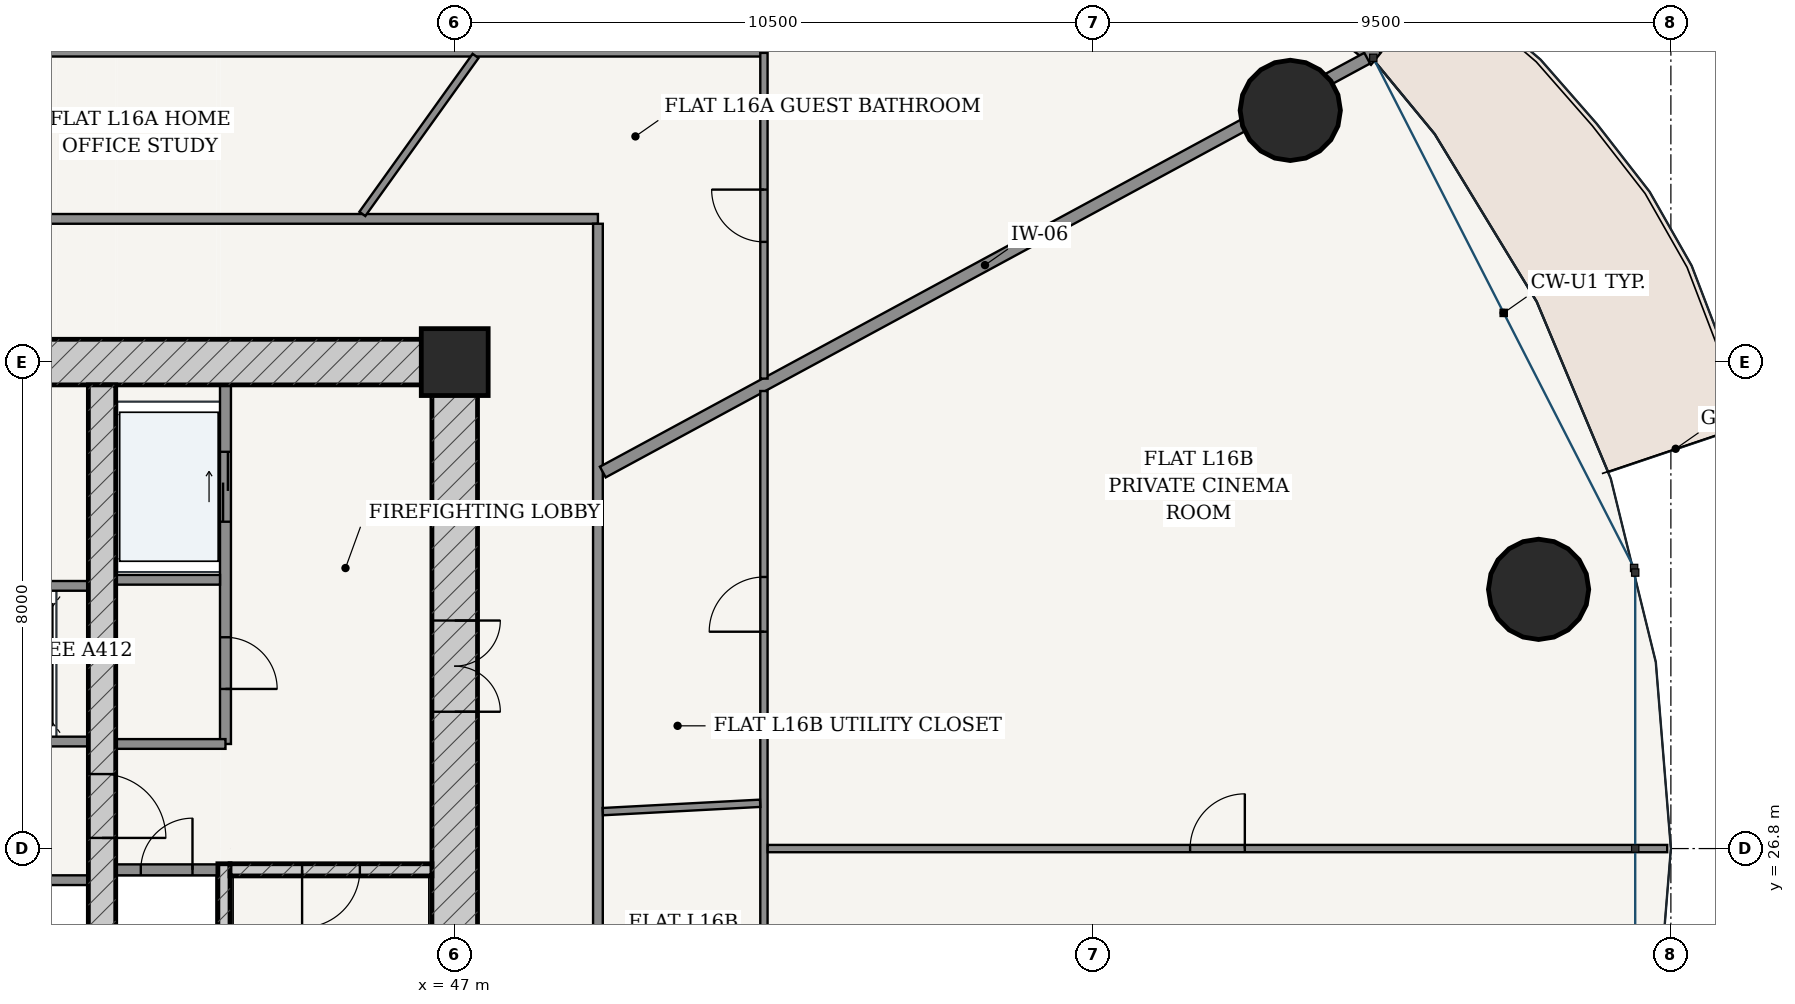
"""IFC4 building model, lengths in metres.
Left out: names, types, materials, properties, quantities, classifications, styles, units other than length and angle.
Written with IfcOpenShell. Run it as: python <this file> out.ifc"""

import sys

from ifc_helpers import new_model, si_unit, direction, frame, frame_2d, origin, origin_2d, place, context, subcontext, project, spatial, rectangle, hollow_circle, extrude, source, transform, mapped, element, fill, save


model = new_model("IFC4")
c1 = context("Model", 3, precision=1e-05, world=origin(), true_north=direction((-0.2419218956, 0.970295726276)))
c2 = subcontext(c1, "Body", "Model", "MODEL_VIEW")
j1 = project(units=[si_unit("LENGTHUNIT", "METRE"), si_unit("PLANEANGLEUNIT", "RADIAN")], contexts=[c1])
p1 = place(None, origin())
s1 = spatial("IfcSite", under=j1, at=p1, CompositionType="ELEMENT")
p2 = place(p1, origin())
s2 = spatial("IfcBuilding", under=s1, at=p2, CompositionType="ELEMENT")
p3 = place(p2, frame((0.0, 0.0, 63.6)))
s3 = spatial("IfcBuildingStorey", under=s2, at=p3, CompositionType="ELEMENT", Elevation=63.6)
p4 = place(p3, frame((47.0, 34.8, 0.0), z_axis=(0.0, 0.0, 1.0), x_axis=(1.0, 0.0, 0.0)))
e1 = element("IfcColumn", 1, at=p4, inside=s3, PredefinedType="COLUMN", context=c2, shape_type="SweptSolid", body=[
    extrude(rectangle(XDim=1.1, YDim=1.1, at=origin_2d()), origin(), (0.0, 0.0, 1.0), 3.6),
])
p5 = place(p3, frame((28.625, 34.8, 0.0), z_axis=(0.0, 0.0, 1.0), x_axis=(1.0, 0.0, 0.0)))
e2 = element("IfcWall", 2, at=p5, inside=s3, PredefinedType="SHEAR", context=c2, shape_type="SweptSolid", body=[
    extrude(rectangle(XDim=18.75, YDim=0.75, at=frame_2d((9.375, 0.0))), origin(), (0.0, 0.0, 1.0), 3.32),
])
p6 = place(p5, frame((8.95, 0.0, 0.0)))
e3 = element("IfcOpeningElement", 3, at=p6, cuts=e2, PredefinedType="OPENING", context=c2, shape_type="SweptSolid", body=[
    extrude(rectangle(XDim=0.85, YDim=2.1, at=frame_2d((0.425, 1.05))), frame((0.0, 0.385, 0.0), z_axis=(0.0, -1.0, 0.0), x_axis=(1.0, 0.0, 0.0)), (0.0, 0.0, 1.0), 0.77),
])
p7 = place(p3, frame((47.0, 19.175, 0.0), z_axis=(0.0, 0.0, 1.0), x_axis=(0.0, 1.0, 0.0)))
e4 = element("IfcWall", 4, at=p7, inside=s3, PredefinedType="SHEAR", context=c2, shape_type="SweptSolid", body=[
    extrude(rectangle(XDim=15.25, YDim=0.75, at=frame_2d((7.625, 0.0))), origin(), (0.0, 0.0, 1.0), 3.32),
])
p8 = place(p7, frame((9.875, 0.0, 0.0)))
e5 = element("IfcOpeningElement", 5, at=p8, cuts=e4, PredefinedType="OPENING", context=c2, shape_type="SweptSolid", body=[
    extrude(rectangle(XDim=1.5, YDim=2.2, at=frame_2d((0.75, 1.1))), frame((0.0, 0.385, 0.0), z_axis=(0.0, -1.0, 0.0), x_axis=(1.0, 0.0, 0.0)), (0.0, 0.0, 1.0), 0.77),
])
p9 = place(p3, frame((43.205, 19.175, 0.0), z_axis=(0.0, 0.0, 1.0), x_axis=(0.0, 1.0, 0.0)))
e6 = element("IfcWall", 6, at=p9, inside=s3, PredefinedType="SOLIDWALL", context=c2, shape_type="SweptSolid", body=[
    extrude(rectangle(XDim=7.375, YDim=0.2, at=frame_2d((3.688, 0.0))), origin(), (0.0, 0.0, 1.0), 3.32),
])
p10 = place(p3, frame((43.305, 26.45, 0.0), z_axis=(0.0, 0.0, 1.0), x_axis=(1.0, 0.0, 0.0)))
e7 = element("IfcWall", 7, at=p10, inside=s3, PredefinedType="SOLIDWALL", context=c2, shape_type="SweptSolid", body=[
    extrude(rectangle(XDim=3.32, YDim=0.2, at=frame_2d((1.66, 0.0))), origin(), (0.0, 0.0, 1.0), 3.32),
])
p11 = place(p10, frame((1.185, 0.0, 0.0)))
e8 = element("IfcOpeningElement", 8, at=p11, cuts=e7, PredefinedType="OPENING", context=c2, shape_type="SweptSolid", body=[
    extrude(rectangle(XDim=0.95, YDim=2.15, at=frame_2d((0.475, 1.075))), frame((0.0, 0.11, 0.0), z_axis=(0.0, -1.0, 0.0), x_axis=(1.0, 0.0, 0.0)), (0.0, 0.0, 1.0), 0.22),
])
p12 = place(p3, frame((41.2, 19.175, 0.0), z_axis=(0.0, 0.0, 1.0), x_axis=(0.0, 1.0, 0.0)))
e9 = element("IfcWall", 9, at=p12, inside=s3, PredefinedType="SHEAR", context=c2, shape_type="SweptSolid", body=[
    extrude(rectangle(XDim=15.25, YDim=0.45, at=frame_2d((7.625, 0.0))), origin(), (0.0, 0.0, 1.0), 3.32),
])
p13 = place(p12, frame((7.8, 0.0, 0.0)))
e10 = element("IfcOpeningElement", 10, at=p13, cuts=e9, PredefinedType="OPENING", context=c2, shape_type="SweptSolid", body=[
    extrude(rectangle(XDim=1.05, YDim=2.15, at=frame_2d((0.525, 1.075))), frame((0.0, 0.235, 0.0), z_axis=(0.0, -1.0, 0.0), x_axis=(1.0, 0.0, 0.0)), (0.0, 0.0, 1.0), 0.47),
])
for number, where, z_axis, x_axis in (
    (11, (64.824, 31.063, 0.0), (0.0, 0.0, 1.0), (1.0, 0.0, 0.0)),
    (12, (60.741, 38.939, 0.0), (0.0, 0.0, 1.0), (1.0, 0.0, 0.0)),
):
    element("IfcColumn", number, at=place(p3, frame(where, z_axis=z_axis, x_axis=x_axis)), inside=s3, PredefinedType="COLUMN", context=c2, shape_type="SweptSolid", body=[
        extrude(hollow_circle(Radius=0.825, WallThickness=0.05, at=origin_2d()), origin(), (0.0, 0.0, 1.0), 3.6),
    ])
p14 = place(p3, frame((62.15, 39.789, 0.0), z_axis=(0.0, 0.0, 1.0), x_axis=(-0.777005352078, 0.62949398952, 0.0)))
e13 = element("IfcWall", 13, at=p14, inside=s3, PredefinedType="SOLIDWALL", context=c2, shape_type="SweptSolid", body=[
    extrude(rectangle(XDim=10.447, YDim=0.26, at=frame_2d((5.223, 0.0))), origin(), (0.0, 0.0, 1.0), 3.32),
])
p15 = place(p14, frame((4.548, 0.0, 0.0)))
e14 = element("IfcOpeningElement", 14, at=p15, cuts=e13, PredefinedType="OPENING", context=c2, shape_type="SweptSolid", body=[
    extrude(rectangle(XDim=1.35, YDim=2.2, at=frame_2d((0.675, 1.1))), frame((0.0, 0.14, 0.0), z_axis=(0.0, -1.0, 0.0), x_axis=(1.0, 0.0, 0.0)), (0.0, 0.0, 1.0), 0.28),
])
p16 = place(p3, frame((41.425, 26.45, 0.0), z_axis=(0.0, 0.0, 1.0), x_axis=(1.0, 0.0, 0.0)))
e15 = element("IfcWall", 15, at=p16, inside=s3, PredefinedType="PARTITIONING", context=c2, shape_type="SweptSolid", body=[
    extrude(rectangle(XDim=1.675, YDim=0.18, at=frame_2d((0.837, 0.0))), origin(), (0.0, 0.0, 1.0), 3.32),
])
p17 = place(p16, frame((0.413, 0.0, 0.0)))
e16 = element("IfcOpeningElement", 16, at=p17, cuts=e15, PredefinedType="OPENING", context=c2, shape_type="SweptSolid", body=[
    extrude(rectangle(XDim=0.85, YDim=2.1, at=frame_2d((0.425, 1.05))), frame((0.0, 0.1, 0.0), z_axis=(0.0, -1.0, 0.0), x_axis=(1.0, 0.0, 0.0)), (0.0, 0.0, 1.0), 0.2),
])
p18 = place(p3, frame((43.23, 28.52, 0.0), z_axis=(0.0, 0.0, 1.0), x_axis=(0.0, 1.0, 0.0)))
e17 = element("IfcWall", 17, at=p18, inside=s3, PredefinedType="PARTITIONING", context=c2, shape_type="SweptSolid", body=[
    extrude(rectangle(XDim=5.905, YDim=0.18, at=frame_2d((2.953, 0.0))), origin(), (0.0, 0.0, 1.0), 3.32),
])
p19 = place(p18, frame((0.905, 0.0, 0.0)))
e18 = element("IfcOpeningElement", 18, at=p19, cuts=e17, PredefinedType="OPENING", context=c2, shape_type="SweptSolid", body=[
    extrude(rectangle(XDim=0.85, YDim=2.1, at=frame_2d((0.425, 1.05))), frame((0.0, 0.1, 0.0), z_axis=(0.0, -1.0, 0.0), x_axis=(1.0, 0.0, 0.0)), (0.0, 0.0, 1.0), 0.2),
])
p20 = place(p18, frame((3.655, 0.0, 0.0)))
e19 = element("IfcOpeningElement", 19, at=p20, cuts=e17, PredefinedType="OPENING", context=c2, shape_type="SweptSolid", body=[
    extrude(rectangle(XDim=1.15, YDim=2.2, at=frame_2d((0.575, 1.1))), frame((0.0, 0.1, 0.0), z_axis=(0.0, -1.0, 0.0), x_axis=(1.0, 0.0, 0.0)), (0.0, 0.0, 1.0), 0.2),
])
p21 = place(p3, frame((41.425, 31.22, 0.0), z_axis=(0.0, 0.0, 1.0), x_axis=(1.0, 0.0, 0.0)))
e20 = element("IfcWall", 20, at=p21, inside=s3, PredefinedType="PARTITIONING", context=c2, shape_type="SweptSolid", body=[
    extrude(rectangle(XDim=1.715, YDim=0.16, at=frame_2d((0.857, 0.0))), origin(), (0.0, 0.0, 1.0), 3.32),
])
p22 = place(p3, frame((41.425, 28.52, 0.0), z_axis=(0.0, 0.0, 1.0), x_axis=(1.0, 0.0, 0.0)))
e21 = element("IfcWall", 21, at=p22, inside=s3, PredefinedType="PARTITIONING", context=c2, shape_type="SweptSolid", body=[
    extrude(rectangle(XDim=1.805, YDim=0.16, at=frame_2d((0.902, 0.0))), origin(), (0.0, 0.0, 1.0), 3.32),
])
p23 = place(p3, frame((35.025, 28.56, 0.0), z_axis=(0.0, 0.0, 1.0), x_axis=(1.0, 0.0, 0.0)))
e22 = element("IfcWall", 22, at=p23, inside=s3, PredefinedType="PARTITIONING", context=c2, shape_type="SweptSolid", body=[
    extrude(rectangle(XDim=5.95, YDim=0.16, at=frame_2d((2.975, 0.0))), origin(), (0.0, 0.0, 1.0), 3.32),
])
p24 = place(p23, frame((0.76, 0.0, 0.0)))
e23 = element("IfcOpeningElement", 23, at=p24, cuts=e22, PredefinedType="OPENING", context=c2, shape_type="SweptSolid", body=[
    extrude(rectangle(XDim=1.1, YDim=2.2, at=frame_2d((0.55, 1.1))), frame((0.0, 0.09, 0.0), z_axis=(0.0, -1.0, 0.0), x_axis=(1.0, 0.0, 0.0)), (0.0, 0.0, 1.0), 0.18),
])
p25 = place(p23, frame((2.425, 0.0, 0.0)))
e24 = element("IfcOpeningElement", 24, at=p25, cuts=e22, PredefinedType="OPENING", context=c2, shape_type="SweptSolid", body=[
    extrude(rectangle(XDim=1.1, YDim=2.2, at=frame_2d((0.55, 1.1))), frame((0.0, 0.09, 0.0), z_axis=(0.0, -1.0, 0.0), x_axis=(1.0, 0.0, 0.0)), (0.0, 0.0, 1.0), 0.18),
])
p26 = place(p23, frame((4.09, 0.0, 0.0)))
e25 = element("IfcOpeningElement", 25, at=p26, cuts=e22, PredefinedType="OPENING", context=c2, shape_type="SweptSolid", body=[
    extrude(rectangle(XDim=1.1, YDim=2.2, at=frame_2d((0.55, 1.1))), frame((0.0, 0.09, 0.0), z_axis=(0.0, -1.0, 0.0), x_axis=(1.0, 0.0, 0.0)), (0.0, 0.0, 1.0), 0.18),
])
for number, where, z_axis, x_axis in (
    (26, (35.025, 31.12, 0.0), (0.0, 0.0, 1.0), (1.0, 0.0, 0.0)),
    (27, (35.025, 26.28, 0.0), (0.0, 0.0, 1.0), (1.0, 0.0, 0.0)),
):
    element("IfcWall", number, at=place(p3, frame(where, z_axis=z_axis, x_axis=x_axis)), inside=s3, PredefinedType="PARTITIONING", context=c2, shape_type="SweptSolid", body=[
        extrude(rectangle(XDim=5.95, YDim=0.16, at=frame_2d((2.975, 0.0))), origin(), (0.0, 0.0, 1.0), 3.32),
    ])
p27 = place(p3, frame((26.645, 37.155, 0.0), z_axis=(0.0, 0.0, 1.0), x_axis=(1.0, 0.0, 0.0)))
e28 = element("IfcWall", 28, at=p27, inside=s3, PredefinedType="PARTITIONING", context=c2, shape_type="SweptSolid", body=[
    extrude(rectangle(XDim=22.71, YDim=0.16, at=frame_2d((11.355, 0.0))), origin(), (0.0, 0.0, 1.0), 2.688),
])
p28 = place(p3, frame((49.355, 16.525, 0.0), z_axis=(0.0, 0.0, 1.0), x_axis=(0.0, 1.0, 0.0)))
e29 = element("IfcWall", 29, at=p28, inside=s3, PredefinedType="PARTITIONING", context=c2, shape_type="SweptSolid", body=[
    extrude(rectangle(XDim=20.55, YDim=0.16, at=frame_2d((10.275, 0.0))), origin(), (0.0, 0.0, 1.0), 2.688),
])
p29 = place(p28, frame((2.733, 0.0, 0.0)))
e30 = element("IfcOpeningElement", 30, at=p29, cuts=e29, PredefinedType="OPENING", context=c2, shape_type="SweptSolid", body=[
    extrude(rectangle(XDim=0.98, YDim=2.2, at=frame_2d((0.49, 1.1))), frame((0.0, 0.09, 0.0), z_axis=(0.0, -1.0, 0.0), x_axis=(1.0, 0.0, 0.0)), (0.0, 0.0, 1.0), 0.18),
])
p30 = place(p3, frame((49.435, 32.991, 0.0), z_axis=(0.0, 0.0, 1.0), x_axis=(0.879369737803, 0.476139542819, 0.0)))
e31 = element("IfcWall", 31, at=p30, inside=s3, PredefinedType="PARTITIONING", context=c2, shape_type="SweptSolid", body=[
    extrude(rectangle(XDim=14.295, YDim=0.2, at=frame_2d((7.147, 0.0))), origin(), (0.0, 0.0, 1.0), 2.688),
])
p31 = place(p3, frame((23.915, 39.885, 0.0), z_axis=(0.0, 0.0, 1.0), x_axis=(1.0, 0.0, 0.0)))
e32 = element("IfcWall", 32, at=p31, inside=s3, PredefinedType="PARTITIONING", context=c2, shape_type="SweptSolid", body=[
    extrude(rectangle(XDim=28.17, YDim=0.12, at=frame_2d((14.085, 0.0))), origin(), (0.0, 0.0, 1.0), 2.688),
])
p32 = place(p31, frame((12.891, 0.0, 0.0)))
e33 = element("IfcOpeningElement", 33, at=p32, cuts=e32, PredefinedType="OPENING", context=c2, shape_type="SweptSolid", body=[
    extrude(rectangle(XDim=0.9, YDim=2.15, at=frame_2d((0.45, 1.075))), frame((0.0, 0.07, 0.0), z_axis=(0.0, -1.0, 0.0), x_axis=(1.0, 0.0, 0.0)), (0.0, 0.0, 1.0), 0.14),
])
p33 = place(p3, frame((52.085, 39.885, 0.0), z_axis=(0.0, 0.0, 1.0), x_axis=(0.0, -1.0, 0.0)))
e34 = element("IfcWall", 34, at=p33, inside=s3, PredefinedType="PARTITIONING", context=c2, shape_type="SweptSolid", body=[
    extrude(rectangle(XDim=5.357, YDim=0.12, at=frame_2d((2.678, 0.0))), origin(), (0.0, 0.0, 1.0), 2.999),
])
p34 = place(p33, frame((2.248, 0.0, 0.0)))
e35 = element("IfcOpeningElement", 35, at=p34, cuts=e34, PredefinedType="OPENING", context=c2, shape_type="SweptSolid", body=[
    extrude(rectangle(XDim=0.86, YDim=2.15, at=frame_2d((0.43, 1.075))), frame((0.0, 0.07, 0.0), z_axis=(0.0, -1.0, 0.0), x_axis=(1.0, 0.0, 0.0)), (0.0, 0.0, 1.0), 0.14),
])
p35 = place(p3, frame((45.481, 37.237, 0.0), z_axis=(0.0, 0.0, 1.0), x_axis=(0.582530715463, 0.812808689387, 0.0)))
e36 = element("IfcWall", 36, at=p35, inside=s3, PredefinedType="PARTITIONING", context=c2, shape_type="SweptSolid", body=[
    extrude(rectangle(XDim=3.197, YDim=0.12, at=frame_2d((1.598, 0.0))), origin(), (0.0, 0.0, 1.0), 3.32),
])
p36 = place(p3, frame((52.085, 34.324, 0.0), z_axis=(0.0, 0.0, 1.0), x_axis=(0.0, -1.0, 0.0)))
e37 = element("IfcWall", 37, at=p36, inside=s3, PredefinedType="PARTITIONING", context=c2, shape_type="SweptSolid", body=[
    extrude(rectangle(XDim=20.609, YDim=0.12, at=frame_2d((10.305, 0.0))), origin(), (0.0, 0.0, 1.0), 2.688),
])
p37 = place(p36, frame((15.972, 0.0, 0.0)))
e38 = element("IfcOpeningElement", 38, at=p37, cuts=e37, PredefinedType="OPENING", context=c2, shape_type="SweptSolid", body=[
    extrude(rectangle(XDim=0.9, YDim=2.15, at=frame_2d((0.45, 1.075))), frame((0.0, 0.07, 0.0), z_axis=(0.0, -1.0, 0.0), x_axis=(1.0, 0.0, 0.0)), (0.0, 0.0, 1.0), 0.14),
])
p38 = place(p36, frame((3.058, 0.0, 0.0)))
e39 = element("IfcOpeningElement", 39, at=p38, cuts=e37, PredefinedType="OPENING", context=c2, shape_type="SweptSolid", body=[
    extrude(rectangle(XDim=0.9, YDim=2.15, at=frame_2d((0.45, 1.075))), frame((0.0, 0.07, 0.0), z_axis=(0.0, -1.0, 0.0), x_axis=(1.0, 0.0, 0.0)), (0.0, 0.0, 1.0), 0.14),
])
p39 = place(p3, frame((52.147, 26.8, 0.0), z_axis=(0.0, 0.0, 1.0), x_axis=(1.0, 0.0, 0.0)))
e40 = element("IfcWall", 40, at=p39, inside=s3, PredefinedType="PARTITIONING", context=c2, shape_type="SweptSolid", body=[
    extrude(rectangle(XDim=14.793, YDim=0.12, at=frame_2d((7.396, 0.0))), origin(), (0.0, 0.0, 1.0), 2.762),
])
p40 = place(p39, frame((6.947, 0.0, 0.0)))
e41 = element("IfcOpeningElement", 41, at=p40, cuts=e40, PredefinedType="OPENING", context=c2, shape_type="SweptSolid", body=[
    extrude(rectangle(XDim=0.9, YDim=2.15, at=frame_2d((0.45, 1.075))), frame((0.0, 0.07, 0.0), z_axis=(0.0, -1.0, 0.0), x_axis=(1.0, 0.0, 0.0)), (0.0, 0.0, 1.0), 0.14),
])
p41 = place(p3, frame((49.435, 27.407, 0.0), z_axis=(0.0, 0.0, 1.0), x_axis=(0.998587742853, 0.053127392413, 0.0)))
e42 = element("IfcWall", 42, at=p41, inside=s3, PredefinedType="PARTITIONING", context=c2, shape_type="SweptSolid", body=[
    extrude(rectangle(XDim=2.592, YDim=0.12, at=frame_2d((1.296, 0.0))), origin(), (0.0, 0.0, 1.0), 3.32),
])
m1 = source(origin(), c2, "Body", "SweptSolid", [
    extrude(rectangle(XDim=1.5, YDim=2.2, at=frame_2d((0.75, 1.1))), frame((0.0, 0.025, 0.0), z_axis=(0.0, -1.0, 0.0), x_axis=(1.0, 0.0, 0.0)), (0.0, 0.0, 1.0), 0.05),
])
p42 = place(p8, frame((1.5, 0.0, 0.0), z_axis=(0.0, 0.0, 1.0), x_axis=(-1.0, 0.0, 0.0)))
e43 = element("IfcDoor", 43, at=p42, inside=s3, OperationType="DOUBLE_DOOR_SINGLE_SWING", PredefinedType="DOOR", context=c2, shape_type="MappedRepresentation", body=[
    mapped(m1, transform((0.0, 0.0, 0.0), scale=1.0)),
])
fill(e5, e43)
m2 = source(origin(), c2, "Body", "SweptSolid", [
    extrude(rectangle(XDim=1.05, YDim=2.15, at=frame_2d((0.525, 1.075))), frame((0.0, 0.025, 0.0), z_axis=(0.0, -1.0, 0.0), x_axis=(1.0, 0.0, 0.0)), (0.0, 0.0, 1.0), 0.05),
])
p43 = place(p13, frame((1.05, 0.0, 0.0), z_axis=(0.0, 0.0, 1.0), x_axis=(-1.0, 0.0, 0.0)))
e44 = element("IfcDoor", 44, at=p43, inside=s3, OperationType="SINGLE_SWING_RIGHT", PredefinedType="DOOR", context=c2, shape_type="MappedRepresentation", body=[
    mapped(m2, transform((0.0, 0.0, 0.0), scale=1.0)),
])
fill(e10, e44)
m3 = source(origin(), c2, "Body", "SweptSolid", [
    extrude(rectangle(XDim=0.95, YDim=2.15, at=frame_2d((0.475, 1.075))), frame((0.0, 0.025, 0.0), z_axis=(0.0, -1.0, 0.0), x_axis=(1.0, 0.0, 0.0)), (0.0, 0.0, 1.0), 0.05),
])
p44 = place(p11, frame((0.95, 0.0, 0.0), z_axis=(0.0, 0.0, 1.0), x_axis=(-1.0, 0.0, 0.0)))
e45 = element("IfcDoor", 45, at=p44, inside=s3, OperationType="SINGLE_SWING_RIGHT", PredefinedType="DOOR", context=c2, shape_type="MappedRepresentation", body=[
    mapped(m3, transform((0.0, 0.0, 0.0), scale=1.0)),
])
fill(e8, e45)
m4 = source(origin(), c2, "Body", "SweptSolid", [
    extrude(rectangle(XDim=0.85, YDim=2.1, at=frame_2d((0.425, 1.05))), frame((0.0, 0.025, 0.0), z_axis=(0.0, -1.0, 0.0), x_axis=(1.0, 0.0, 0.0)), (0.0, 0.0, 1.0), 0.05),
])
p45 = place(p17, origin())
e46 = element("IfcDoor", 46, at=p45, inside=s3, OperationType="SINGLE_SWING_RIGHT", PredefinedType="DOOR", context=c2, shape_type="MappedRepresentation", body=[
    mapped(m4, transform((0.0, 0.0, 0.0), scale=1.0)),
])
fill(e16, e46)
p46 = place(p19, frame((0.85, 0.0, 0.0), z_axis=(0.0, 0.0, 1.0), x_axis=(-1.0, 0.0, 0.0)))
e47 = element("IfcDoor", 47, at=p46, inside=s3, OperationType="SINGLE_SWING_RIGHT", PredefinedType="DOOR", context=c2, shape_type="MappedRepresentation", body=[
    mapped(m4, transform((0.0, 0.0, 0.0), scale=1.0)),
])
fill(e18, e47)
m5 = source(origin(), c2, "Body", "SweptSolid", [
    extrude(rectangle(XDim=1.15, YDim=2.2, at=frame_2d((0.575, 1.1))), frame((0.0, 0.025, 0.0), z_axis=(0.0, -1.0, 0.0), x_axis=(1.0, 0.0, 0.0)), (0.0, 0.0, 1.0), 0.05),
])
p47 = place(p20, origin())
e48 = element("IfcDoor", 48, at=p47, inside=s3, OperationType="DOUBLE_DOOR_SLIDING", PredefinedType="DOOR", context=c2, shape_type="MappedRepresentation", body=[
    mapped(m5, transform((0.0, 0.0, 0.0), scale=1.0)),
])
fill(e19, e48)
m6 = source(origin(), c2, "Body", "SweptSolid", [
    extrude(rectangle(XDim=0.86, YDim=2.15, at=frame_2d((0.43, 1.075))), frame((0.0, 0.025, 0.0), z_axis=(0.0, -1.0, 0.0), x_axis=(1.0, 0.0, 0.0)), (0.0, 0.0, 1.0), 0.05),
])
p48 = place(p34, frame((0.86, 0.0, 0.0), z_axis=(0.0, 0.0, 1.0), x_axis=(-1.0, 0.0, 0.0)))
e49 = element("IfcDoor", 49, at=p48, inside=s3, OperationType="SINGLE_SWING_RIGHT", PredefinedType="DOOR", context=c2, shape_type="MappedRepresentation", body=[
    mapped(m6, transform((0.0, 0.0, 0.0), scale=1.0)),
])
fill(e35, e49)
m7 = source(origin(), c2, "Body", "SweptSolid", [
    extrude(rectangle(XDim=0.9, YDim=2.15, at=frame_2d((0.45, 1.075))), frame((0.0, 0.025, 0.0), z_axis=(0.0, -1.0, 0.0), x_axis=(1.0, 0.0, 0.0)), (0.0, 0.0, 1.0), 0.05),
])
p49 = place(p40, origin())
e50 = element("IfcDoor", 50, at=p49, inside=s3, OperationType="SINGLE_SWING_RIGHT", PredefinedType="DOOR", context=c2, shape_type="MappedRepresentation", body=[
    mapped(m7, transform((0.0, 0.0, 0.0), scale=1.0)),
])
fill(e41, e50)
p50 = place(p38, frame((0.9, 0.0, 0.0), z_axis=(0.0, 0.0, 1.0), x_axis=(-1.0, 0.0, 0.0)))
e51 = element("IfcDoor", 51, at=p50, inside=s3, OperationType="SINGLE_SWING_LEFT", PredefinedType="DOOR", context=c2, shape_type="MappedRepresentation", body=[
    mapped(m7, transform((0.0, 0.0, 0.0), scale=1.0)),
])
fill(e39, e51)
save(model, sys.argv[1])
